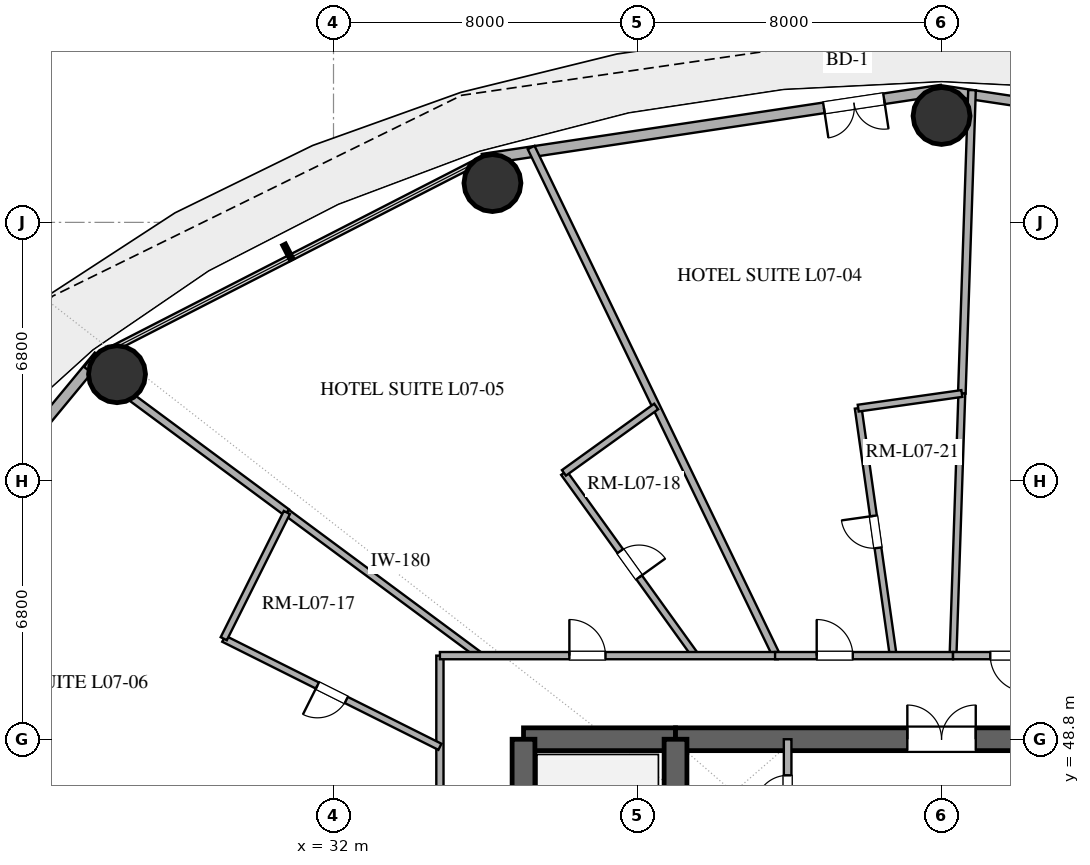
"""IFC4 building model, lengths in metres.
Left out: names, types, materials, properties, quantities, classifications, styles, units other than length and angle.
Written with IfcOpenShell. Run it as: python <this file> out.ifc"""

import sys

from ifc_helpers import new_model, si_unit, direction, frame, frame_2d, origin, origin_2d, place, context, subcontext, project, spatial, rectangle, hollow_circle, extrude, element, fill, save


model = new_model("IFC4")
c1 = context("Model", 3, precision=1e-05, world=origin(), true_north=direction((0.0, 1.0)))
c2 = subcontext(c1, "Body", "Model", "MODEL_VIEW")
j1 = project(units=[si_unit("LENGTHUNIT", "METRE"), si_unit("PLANEANGLEUNIT", "RADIAN")], contexts=[c1])
p1 = place(None, origin())
s1 = spatial("IfcSite", under=j1, at=p1, CompositionType="ELEMENT")
p2 = place(p1, origin())
s2 = spatial("IfcBuilding", under=s1, at=p2, CompositionType="ELEMENT")
p3 = place(p2, frame((0.0, 0.0, 35.4)))
s3 = spatial("IfcBuildingStorey", under=s2, at=p3, CompositionType="ELEMENT", Elevation=35.4)
p4 = place(p3, frame((37.0, 48.8, 0.0), z_axis=(0.0, 0.0, 1.0), x_axis=(1.0, 0.0, 0.0)))
e1 = element("IfcWall", 1, at=p4, inside=s3, PredefinedType="SHEAR", context=c2, shape_type="SweptSolid", body=[
    extrude(rectangle(XDim=4.0, YDim=0.6, at=frame_2d((2.0, 0.0))), origin(), (0.0, 0.0, 1.0), 3.38),
])
p5 = place(p3, frame((41.0, 48.8, 0.0), z_axis=(0.0, 0.0, 1.0), x_axis=(1.0, 0.0, 0.0)))
e2 = element("IfcWall", 2, at=p5, inside=s3, PredefinedType="SHEAR", context=c2, shape_type="SweptSolid", body=[
    extrude(rectangle(XDim=14.0, YDim=0.6, at=frame_2d((7.0, 0.0))), origin(), (0.0, 0.0, 1.0), 3.38),
])
p6 = place(p5, frame((6.1, 0.0, 0.0)))
e3 = element("IfcOpeningElement", 3, at=p6, cuts=e2, PredefinedType="OPENING", context=c2, shape_type="SweptSolid", body=[
    extrude(rectangle(XDim=1.8, YDim=2.25, at=frame_2d((0.9, 1.125))), frame((0.0, 0.31, 0.0), z_axis=(0.0, -1.0, 0.0), x_axis=(1.0, 0.0, 0.0)), (0.0, 0.0, 1.0), 0.62),
])
p7 = place(p3, frame((37.0, 35.2, 0.0), z_axis=(0.0, 0.0, 1.0), x_axis=(0.0, 1.0, 0.0)))
e4 = element("IfcWall", 4, at=p7, inside=s3, PredefinedType="SHEAR", context=c2, shape_type="SweptSolid", body=[
    extrude(rectangle(XDim=13.6, YDim=0.6, at=frame_2d((6.8, 0.0))), origin(), (0.0, 0.0, 1.0), 3.38),
])
p8 = place(p7, frame((1.5, 0.0, 0.0)))
e5 = element("IfcOpeningElement", 5, at=p8, cuts=e4, PredefinedType="OPENING", context=c2, shape_type="SweptSolid", body=[
    extrude(rectangle(XDim=1.2, YDim=2.15, at=frame_2d((0.6, 1.075))), frame((0.0, 0.31, 0.0), z_axis=(0.0, -1.0, 0.0), x_axis=(1.0, 0.0, 0.0)), (0.0, 0.0, 1.0), 0.62),
])
p9 = place(p3, frame((41.0, 35.2, 0.0), z_axis=(0.0, 0.0, 1.0), x_axis=(0.0, 1.0, 0.0)))
e6 = element("IfcWall", 6, at=p9, inside=s3, PredefinedType="SHEAR", context=c2, shape_type="SweptSolid", body=[
    extrude(rectangle(XDim=13.6, YDim=0.6, at=frame_2d((6.8, 0.0))), origin(), (0.0, 0.0, 1.0), 3.38),
])
p10 = place(p9, frame((1.15, 0.0, 0.0)))
e7 = element("IfcOpeningElement", 7, at=p10, cuts=e6, PredefinedType="OPENING", context=c2, shape_type="SweptSolid", body=[
    extrude(rectangle(XDim=1.1, YDim=2.2, at=frame_2d((0.55, 1.1))), frame((0.0, 0.31, 0.0), z_axis=(0.0, -1.0, 0.0), x_axis=(1.0, 0.0, 0.0)), (0.0, 0.0, 1.0), 0.62),
])
for number, where, z_axis, x_axis in (
    (8, (48.0, 65.2, 0.0), (0.0, 0.0, 1.0), (1.0, 0.0, 0.0)),
    (9, (36.182, 63.434, 0.0), (0.0, 0.0, 1.0), (1.0, 0.0, 0.0)),
    (10, (26.303, 58.405, 0.0), (0.0, 0.0, 1.0), (1.0, 0.0, 0.0)),
):
    element("IfcColumn", number, at=place(p3, frame(where, z_axis=z_axis, x_axis=x_axis)), inside=s3, PredefinedType="COLUMN", context=c2, shape_type="SweptSolid", body=[
        extrude(hollow_circle(Radius=0.75, WallThickness=0.04, at=origin_2d()), origin(), (0.0, 0.0, 1.0), 3.38),
    ])
p11 = place(p3, frame((60.078, 64.062, 0.0), z_axis=(0.0, 0.0, 1.0), x_axis=(-0.988864835849, 0.148816452121, 0.0)))
e11 = element("IfcWall", 11, at=p11, inside=s3, PredefinedType="SOLIDWALL", context=c2, shape_type="SweptSolid", body=[
    extrude(rectangle(XDim=12.214, YDim=0.25, at=frame_2d((6.107, 0.0))), origin(), (0.0, 0.0, 1.0), 3.38),
])
p12 = place(p11, frame((8.195, 0.0, 1.42)))
e12 = element("IfcOpeningElement", 12, at=p12, cuts=e11, PredefinedType="OPENING", context=c2, shape_type="SweptSolid", body=[
    extrude(rectangle(XDim=1.0, YDim=1.05, at=frame_2d((0.5, 0.525))), frame((0.0, 0.135, 0.0), z_axis=(0.0, -1.0, 0.0), x_axis=(1.0, 0.0, 0.0)), (0.0, 0.0, 1.0), 0.27),
])
p13 = place(p3, frame((48.0, 65.88, 0.0), z_axis=(0.0, 0.0, 1.0), x_axis=(-0.988864835849, -0.148816452121, 0.0)))
e13 = element("IfcWall", 13, at=p13, inside=s3, PredefinedType="SOLIDWALL", context=c2, shape_type="SweptSolid", body=[
    extrude(rectangle(XDim=12.214, YDim=0.28, at=frame_2d((6.107, 0.0))), origin(), (0.0, 0.0, 1.0), 3.38),
])
p14 = place(p13, frame((1.531, 0.0, 0.0)))
e14 = element("IfcOpeningElement", 14, at=p14, cuts=e13, PredefinedType="OPENING", context=c2, shape_type="SweptSolid", body=[
    extrude(rectangle(XDim=1.6, YDim=2.25, at=frame_2d((0.8, 1.125))), frame((0.0, 0.15, 0.0), z_axis=(0.0, -1.0, 0.0), x_axis=(1.0, 0.0, 0.0)), (0.0, 0.0, 1.0), 0.3),
])
p15 = place(p3, frame((25.826, 58.886, 0.0), z_axis=(0.0, 0.0, 1.0), x_axis=(-0.637296809613, -0.770618437657, 0.0)))
e15 = element("IfcWall", 15, at=p15, inside=s3, PredefinedType="SOLIDWALL", context=c2, shape_type="SweptSolid", body=[
    extrude(rectangle(XDim=10.053, YDim=0.28, at=frame_2d((5.027, 0.0))), origin(), (0.0, 0.0, 1.0), 3.38),
])
p16 = place(p15, frame((2.998, 0.0, 0.85)))
e16 = element("IfcOpeningElement", 16, at=p16, cuts=e15, PredefinedType="OPENING", context=c2, shape_type="SweptSolid", body=[
    extrude(rectangle(XDim=1.2, YDim=1.8, at=frame_2d((0.6, 0.9))), frame((0.0, 0.15, 0.0), z_axis=(0.0, -1.0, 0.0), x_axis=(1.0, 0.0, 0.0)), (0.0, 0.0, 1.0), 0.3),
])
p17 = place(p15, frame((5.73, 0.0, 0.85)))
e17 = element("IfcOpeningElement", 17, at=p17, cuts=e15, PredefinedType="OPENING", context=c2, shape_type="SweptSolid", body=[
    extrude(rectangle(XDim=1.2, YDim=1.8, at=frame_2d((0.6, 0.9))), frame((0.0, 0.15, 0.0), z_axis=(0.0, -1.0, 0.0), x_axis=(1.0, 0.0, 0.0)), (0.0, 0.0, 1.0), 0.3),
])
p18 = place(p3, frame((43.95, 46.2, 0.0), z_axis=(0.0, 0.0, 1.0), x_axis=(0.0, 1.0, 0.0)))
e18 = element("IfcWall", 18, at=p18, inside=s3, PredefinedType="SOLIDWALL", context=c2, shape_type="SweptSolid", body=[
    extrude(rectangle(XDim=2.6, YDim=0.2, at=frame_2d((1.3, 0.0))), origin(), (0.0, 0.0, 1.0), 2.74),
])
p19 = place(p18, frame((0.8, 0.0, 0.0)))
e19 = element("IfcOpeningElement", 19, at=p19, cuts=e18, PredefinedType="OPENING", context=c2, shape_type="SweptSolid", body=[
    extrude(rectangle(XDim=0.85, YDim=2.15, at=frame_2d((0.425, 1.075))), frame((0.0, 0.11, 0.0), z_axis=(0.0, -1.0, 0.0), x_axis=(1.0, 0.0, 0.0)), (0.0, 0.0, 1.0), 0.22),
])
p20 = place(p3, frame((48.802, 65.88, 0.0), z_axis=(0.0, 0.0, 1.0), x_axis=(-0.033562144005, -0.999436632553, 0.0)))
e20 = element("IfcWall", 20, at=p20, inside=s3, PredefinedType="PARTITIONING", context=c2, shape_type="SweptSolid", body=[
    extrude(rectangle(XDim=7.987, YDim=0.2, at=frame_2d((3.994, 0.0))), origin(), (0.0, 0.0, 1.0), 2.74),
])
p21 = place(p3, frame((43.655, 51.0, 0.0), z_axis=(0.0, 0.0, 1.0), x_axis=(-0.434738949034, 0.900556520266, 0.0)))
e21 = element("IfcWall", 21, at=p21, inside=s3, PredefinedType="PARTITIONING", context=c2, shape_type="SweptSolid", body=[
    extrude(rectangle(XDim=14.847, YDim=0.2, at=frame_2d((7.424, 0.0))), origin(), (0.0, 0.0, 1.0), 2.74),
])
p22 = place(p3, frame((48.534, 57.897, 0.0), z_axis=(0.0, 0.0, 1.0), x_axis=(-0.033537457551, -0.999437461246, 0.0)))
e22 = element("IfcWall", 22, at=p22, inside=s3, PredefinedType="PLUMBINGWALL", context=c2, shape_type="SweptSolid", body=[
    extrude(rectangle(XDim=6.901, YDim=0.18, at=frame_2d((3.451, 0.0))), origin(), (0.0, 0.0, 1.0), 2.74),
])
p23 = place(p3, frame((34.8, 33.0, 0.0), z_axis=(0.0, 0.0, 1.0), x_axis=(0.0, 1.0, 0.0)))
e23 = element("IfcWall", 23, at=p23, inside=s3, PredefinedType="PARTITIONING", context=c2, shape_type="SweptSolid", body=[
    extrude(rectangle(XDim=18.0, YDim=0.19, at=frame_2d((9.0, 0.0))), origin(), (0.0, 0.0, 1.0), 2.74),
])
p24 = place(p23, frame((7.274, 0.0, 0.0)))
e24 = element("IfcOpeningElement", 24, at=p24, cuts=e23, PredefinedType="OPENING", context=c2, shape_type="SweptSolid", body=[
    extrude(rectangle(XDim=1.0, YDim=2.2, at=frame_2d((0.5, 1.1))), frame((0.0, 0.105, 0.0), z_axis=(0.0, -1.0, 0.0), x_axis=(1.0, 0.0, 0.0)), (0.0, 0.0, 1.0), 0.21),
])
p25 = place(p23, frame((12.854, 0.0, 0.0)))
e25 = element("IfcOpeningElement", 25, at=p25, cuts=e23, PredefinedType="OPENING", context=c2, shape_type="SweptSolid", body=[
    extrude(rectangle(XDim=0.95, YDim=2.15, at=frame_2d((0.475, 1.075))), frame((0.0, 0.105, 0.0), z_axis=(0.0, -1.0, 0.0), x_axis=(1.0, 0.0, 0.0)), (0.0, 0.0, 1.0), 0.21),
])
p26 = place(p3, frame((46.728, 51.0, 0.0), z_axis=(0.0, 0.0, 1.0), x_axis=(-0.139991961821, 0.990152640064, 0.0)))
e26 = element("IfcWall", 26, at=p26, inside=s3, PredefinedType="PLUMBINGWALL", context=c2, shape_type="SweptSolid", body=[
    extrude(rectangle(XDim=6.576, YDim=0.18, at=frame_2d((3.288, 0.0))), origin(), (0.0, 0.0, 1.0), 2.74),
])
p27 = place(p26, frame((2.863, 0.0, 0.0)))
e27 = element("IfcOpeningElement", 27, at=p27, cuts=e26, PredefinedType="OPENING", context=c2, shape_type="SweptSolid", body=[
    extrude(rectangle(XDim=0.85, YDim=2.1, at=frame_2d((0.425, 1.05))), frame((0.0, 0.1, 0.0), z_axis=(0.0, -1.0, 0.0), x_axis=(1.0, 0.0, 0.0)), (0.0, 0.0, 1.0), 0.2),
])
p28 = place(p3, frame((25.496, 58.675, 0.0), z_axis=(0.0, 0.0, 1.0), x_axis=(0.803457728354, -0.595361804912, 0.0)))
e28 = element("IfcWall", 28, at=p28, inside=s3, PredefinedType="PARTITIONING", context=c2, shape_type="SweptSolid", body=[
    extrude(rectangle(XDim=6.566, YDim=0.2, at=frame_2d((3.283, 0.0))), origin(), (0.0, 0.0, 1.0), 2.74),
])
p29 = place(p3, frame((34.8, 48.601, 0.0), z_axis=(0.0, 0.0, 1.0), x_axis=(-0.894404156958, 0.447259660617, 0.0)))
e29 = element("IfcWall", 29, at=p29, inside=s3, PredefinedType="PLUMBINGWALL", context=c2, shape_type="SweptSolid", body=[
    extrude(rectangle(XDim=6.36, YDim=0.18, at=frame_2d((3.18, 0.0))), origin(), (0.0, 0.0, 1.0), 2.74),
])
p30 = place(p29, frame((2.755, 0.0, 0.0)))
e30 = element("IfcOpeningElement", 30, at=p30, cuts=e29, PredefinedType="OPENING", context=c2, shape_type="SweptSolid", body=[
    extrude(rectangle(XDim=0.85, YDim=2.1, at=frame_2d((0.425, 1.05))), frame((0.0, 0.1, 0.0), z_axis=(0.0, -1.0, 0.0), x_axis=(1.0, 0.0, 0.0)), (0.0, 0.0, 1.0), 0.2),
])
p31 = place(p3, frame((30.772, 54.766, 0.0), z_axis=(0.0, 0.0, 1.0), x_axis=(0.803451199128, -0.595370616187, 0.0)))
e31 = element("IfcWall", 31, at=p31, inside=s3, PredefinedType="PLUMBINGWALL", context=c2, shape_type="SweptSolid", body=[
    extrude(rectangle(XDim=6.325, YDim=0.18, at=frame_2d((3.163, 0.0))), origin(), (0.0, 0.0, 1.0), 2.74),
])
p32 = place(p3, frame((38.063, 55.809, 0.0), z_axis=(0.0, 0.0, 1.0), x_axis=(0.584084318507, -0.811692989297, 0.0)))
e32 = element("IfcWall", 32, at=p32, inside=s3, PredefinedType="PLUMBINGWALL", context=c2, shape_type="SweptSolid", body=[
    extrude(rectangle(XDim=5.924, YDim=0.18, at=frame_2d((2.962, 0.0))), origin(), (0.0, 0.0, 1.0), 2.74),
])
p33 = place(p32, frame((2.537, 0.0, 0.0)))
e33 = element("IfcOpeningElement", 33, at=p33, cuts=e32, PredefinedType="OPENING", context=c2, shape_type="SweptSolid", body=[
    extrude(rectangle(XDim=0.85, YDim=2.1, at=frame_2d((0.425, 1.05))), frame((0.0, 0.1, 0.0), z_axis=(0.0, -1.0, 0.0), x_axis=(1.0, 0.0, 0.0)), (0.0, 0.0, 1.0), 0.2),
])
p34 = place(p3, frame((34.8, 51.0, 0.0), z_axis=(0.0, 0.0, 1.0), x_axis=(1.0, 0.0, 0.0)))
e34 = element("IfcWall", 34, at=p34, inside=s3, PredefinedType="PARTITIONING", context=c2, shape_type="SweptSolid", body=[
    extrude(rectangle(XDim=8.891, YDim=0.19, at=frame_2d((4.445, 0.0))), origin(), (0.0, 0.0, 1.0), 2.74),
])
p35 = place(p34, frame((3.407, 0.0, 0.0)))
e35 = element("IfcOpeningElement", 35, at=p35, cuts=e34, PredefinedType="OPENING", context=c2, shape_type="SweptSolid", body=[
    extrude(rectangle(XDim=0.95, YDim=2.15, at=frame_2d((0.475, 1.075))), frame((0.0, 0.105, 0.0), z_axis=(0.0, -1.0, 0.0), x_axis=(1.0, 0.0, 0.0)), (0.0, 0.0, 1.0), 0.21),
])
p36 = place(p3, frame((29.112, 51.446, 0.0), z_axis=(0.0, 0.0, 1.0), x_axis=(0.447292516126, 0.894387726334, 0.0)))
e36 = element("IfcWall", 36, at=p36, inside=s3, PredefinedType="PLUMBINGWALL", context=c2, shape_type="SweptSolid", body=[
    extrude(rectangle(XDim=3.712, YDim=0.18, at=frame_2d((1.856, 0.0))), origin(), (0.0, 0.0, 1.0), 2.74),
])
p37 = place(p3, frame((43.62, 51.0, 0.0), z_axis=(0.0, 0.0, 1.0), x_axis=(1.0, 0.0, 0.0)))
e37 = element("IfcWall", 37, at=p37, inside=s3, PredefinedType="PARTITIONING", context=c2, shape_type="SweptSolid", body=[
    extrude(rectangle(XDim=4.683, YDim=0.19, at=frame_2d((2.341, 0.0))), origin(), (0.0, 0.0, 1.0), 2.74),
])
p38 = place(p37, frame((1.095, 0.0, 0.0)))
e38 = element("IfcOpeningElement", 38, at=p38, cuts=e37, PredefinedType="OPENING", context=c2, shape_type="SweptSolid", body=[
    extrude(rectangle(XDim=0.95, YDim=2.15, at=frame_2d((0.475, 1.075))), frame((0.0, 0.105, 0.0), z_axis=(0.0, -1.0, 0.0), x_axis=(1.0, 0.0, 0.0)), (0.0, 0.0, 1.0), 0.21),
])
p39 = place(p3, frame((40.49, 57.555, 0.0), z_axis=(0.0, 0.0, 1.0), x_axis=(-0.811670601443, -0.584115429305, 0.0)))
e39 = element("IfcWall", 39, at=p39, inside=s3, PredefinedType="PLUMBINGWALL", context=c2, shape_type="SweptSolid", body=[
    extrude(rectangle(XDim=2.99, YDim=0.18, at=frame_2d((1.495, 0.0))), origin(), (0.0, 0.0, 1.0), 2.74),
])
p40 = place(p3, frame((51.213, 51.0, 0.0), z_axis=(0.0, 0.0, 1.0), x_axis=(-1.0, 0.0, 0.0)))
e40 = element("IfcWall", 40, at=p40, inside=s3, PredefinedType="PARTITIONING", context=c2, shape_type="SweptSolid", body=[
    extrude(rectangle(XDim=2.911, YDim=0.19, at=frame_2d((1.455, 0.0))), origin(), (0.0, 0.0, 1.0), 2.74),
])
p41 = place(p40, frame((0.98, 0.0, 0.0)))
e41 = element("IfcOpeningElement", 41, at=p41, cuts=e40, PredefinedType="OPENING", context=c2, shape_type="SweptSolid", body=[
    extrude(rectangle(XDim=0.95, YDim=2.15, at=frame_2d((0.475, 1.075))), frame((0.0, 0.105, 0.0), z_axis=(0.0, -1.0, 0.0), x_axis=(1.0, 0.0, 0.0)), (0.0, 0.0, 1.0), 0.21),
])
p42 = place(p3, frame((45.807, 57.512, 0.0), z_axis=(0.0, 0.0, 1.0), x_axis=(0.990152382036, 0.139993786823, 0.0)))
e42 = element("IfcWall", 42, at=p42, inside=s3, PredefinedType="PLUMBINGWALL", context=c2, shape_type="SweptSolid", body=[
    extrude(rectangle(XDim=2.754, YDim=0.18, at=frame_2d((1.377, 0.0))), origin(), (0.0, 0.0, 1.0), 2.74),
])
p43 = place(p14, origin())
e43 = element("IfcDoor", 43, at=p43, inside=s3, OperationType="DOUBLE_DOOR_SINGLE_SWING", PredefinedType="DOOR", context=c2, shape_type="SweptSolid", body=[
    extrude(rectangle(XDim=1.6, YDim=2.25, at=frame_2d((0.8, 1.125))), frame((0.0, 0.025, 0.0), z_axis=(0.0, -1.0, 0.0), x_axis=(1.0, 0.0, 0.0)), (0.0, 0.0, 1.0), 0.05),
])
fill(e14, e43)
p44 = place(p6, origin())
e44 = element("IfcDoor", 44, at=p44, inside=s3, OperationType="DOUBLE_DOOR_SINGLE_SWING", PredefinedType="DOOR", context=c2, shape_type="SweptSolid", body=[
    extrude(rectangle(XDim=1.8, YDim=2.25, at=frame_2d((0.9, 1.125))), frame((0.0, 0.025, 0.0), z_axis=(0.0, -1.0, 0.0), x_axis=(1.0, 0.0, 0.0)), (0.0, 0.0, 1.0), 0.05),
])
fill(e3, e44)
p45 = place(p19, origin())
e45 = element("IfcDoor", 45, at=p45, inside=s3, OperationType="SINGLE_SWING_LEFT", PredefinedType="DOOR", context=c2, shape_type="SweptSolid", body=[
    extrude(rectangle(XDim=0.85, YDim=2.15, at=frame_2d((0.425, 1.075))), frame((0.0, 0.025, 0.0), z_axis=(0.0, -1.0, 0.0), x_axis=(1.0, 0.0, 0.0)), (0.0, 0.0, 1.0), 0.05),
])
fill(e19, e45)
p46 = place(p27, origin())
e46 = element("IfcDoor", 46, at=p46, inside=s3, OperationType="SINGLE_SWING_RIGHT", PredefinedType="DOOR", context=c2, shape_type="SweptSolid", body=[
    extrude(rectangle(XDim=0.85, YDim=2.1, at=frame_2d((0.425, 1.05))), frame((0.0, 0.025, 0.0), z_axis=(0.0, -1.0, 0.0), x_axis=(1.0, 0.0, 0.0)), (0.0, 0.0, 1.0), 0.05),
])
fill(e27, e46)
p47 = place(p30, origin())
e47 = element("IfcDoor", 47, at=p47, inside=s3, OperationType="SINGLE_SWING_RIGHT", PredefinedType="DOOR", context=c2, shape_type="SweptSolid", body=[
    extrude(rectangle(XDim=0.85, YDim=2.1, at=frame_2d((0.425, 1.05))), frame((0.0, 0.025, 0.0), z_axis=(0.0, -1.0, 0.0), x_axis=(1.0, 0.0, 0.0)), (0.0, 0.0, 1.0), 0.05),
])
fill(e30, e47)
p48 = place(p33, origin())
e48 = element("IfcDoor", 48, at=p48, inside=s3, OperationType="SINGLE_SWING_RIGHT", PredefinedType="DOOR", context=c2, shape_type="SweptSolid", body=[
    extrude(rectangle(XDim=0.85, YDim=2.1, at=frame_2d((0.425, 1.05))), frame((0.0, 0.025, 0.0), z_axis=(0.0, -1.0, 0.0), x_axis=(1.0, 0.0, 0.0)), (0.0, 0.0, 1.0), 0.05),
])
fill(e33, e48)
p49 = place(p35, origin())
e49 = element("IfcDoor", 49, at=p49, inside=s3, OperationType="SINGLE_SWING_LEFT", PredefinedType="DOOR", context=c2, shape_type="SweptSolid", body=[
    extrude(rectangle(XDim=0.95, YDim=2.15, at=frame_2d((0.475, 1.075))), frame((0.0, 0.025, 0.0), z_axis=(0.0, -1.0, 0.0), x_axis=(1.0, 0.0, 0.0)), (0.0, 0.0, 1.0), 0.05),
])
fill(e35, e49)
p50 = place(p38, origin())
e50 = element("IfcDoor", 50, at=p50, inside=s3, OperationType="SINGLE_SWING_LEFT", PredefinedType="DOOR", context=c2, shape_type="SweptSolid", body=[
    extrude(rectangle(XDim=0.95, YDim=2.15, at=frame_2d((0.475, 1.075))), frame((0.0, 0.025, 0.0), z_axis=(0.0, -1.0, 0.0), x_axis=(1.0, 0.0, 0.0)), (0.0, 0.0, 1.0), 0.05),
])
fill(e38, e50)
p51 = place(p41, origin())
e51 = element("IfcDoor", 51, at=p51, inside=s3, OperationType="SINGLE_SWING_LEFT", PredefinedType="DOOR", context=c2, shape_type="SweptSolid", body=[
    extrude(rectangle(XDim=0.95, YDim=2.15, at=frame_2d((0.475, 1.075))), frame((0.0, 0.025, 0.0), z_axis=(0.0, -1.0, 0.0), x_axis=(1.0, 0.0, 0.0)), (0.0, 0.0, 1.0), 0.05),
])
fill(e41, e51)
save(model, sys.argv[1])
